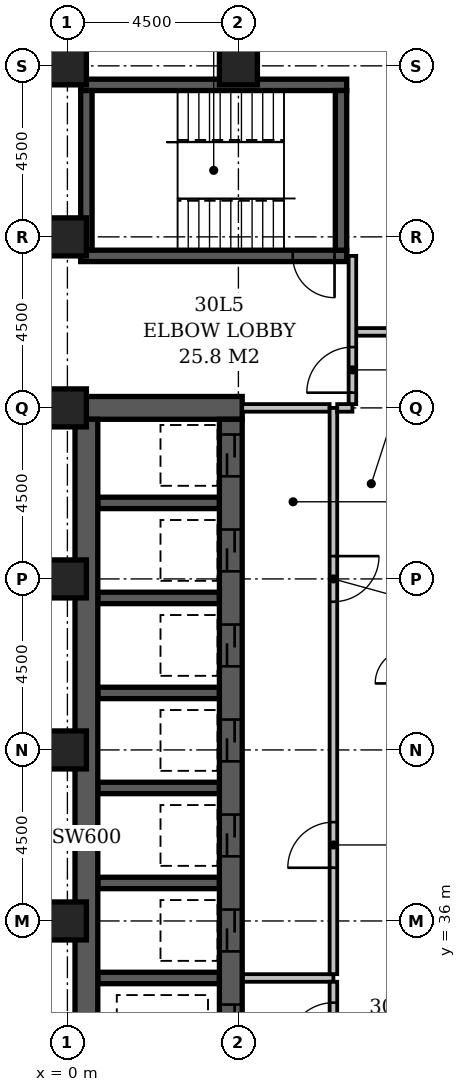
"""IFC4 building model, lengths in metres.
Left out: names, types, materials, properties, quantities, classifications, styles, units other than length and angle.
Written with IfcOpenShell. Run it as: python <this file> out.ifc"""

import sys

from ifc_helpers import new_model, si_unit, direction, frame, frame_2d, origin, origin_2d, place, context, subcontext, project, spatial, rectangle, extrude, element, fill, save


model = new_model("IFC4")
c1 = context("Model", 3, precision=1e-05, world=origin(), true_north=direction((0.0, 1.0)))
c2 = subcontext(c1, "Body", "Model", "MODEL_VIEW")
j1 = project(units=[si_unit("LENGTHUNIT", "METRE"), si_unit("PLANEANGLEUNIT", "RADIAN")], contexts=[c1])
p1 = place(None, origin())
s1 = spatial("IfcSite", under=j1, at=p1, CompositionType="ELEMENT")
p2 = place(p1, origin())
s2 = spatial("IfcBuilding", under=s1, at=p2, CompositionType="ELEMENT")
p3 = place(p2, frame((0.0, 0.0, 123.2)))
s3 = spatial("IfcBuildingStorey", under=s2, at=p3, CompositionType="ELEMENT", Elevation=123.2)
p4 = place(p3, frame((0.2, 49.5, -0.3), z_axis=(0.0, 0.0, 1.0), x_axis=(1.0, 0.0, 0.0)))
e1 = element("IfcWall", 1, at=p4, inside=s3, PredefinedType="SHEAR", context=c2, shape_type="SweptSolid", body=[
    extrude(rectangle(XDim=4.4, YDim=0.6, at=frame_2d((2.2, 0.0))), origin(), (0.0, 0.0, 1.0), 3.6),
])
p5 = place(p3, frame((0.35, 53.5, -0.3), z_axis=(0.0, 0.0, 1.0), x_axis=(1.0, 0.0, 0.0)))
e2 = element("IfcWall", 2, at=p5, inside=s3, PredefinedType="SHEAR", context=c2, shape_type="SweptSolid", body=[
    extrude(rectangle(XDim=7.0, YDim=0.3, at=frame_2d((3.5, 0.0))), origin(), (0.0, 0.0, 1.0), 3.6),
])
p6 = place(p5, frame((5.58, 0.0, 0.3)))
e3 = element("IfcOpeningElement", 3, at=p6, cuts=e2, PredefinedType="OPENING", context=c2, shape_type="SweptSolid", body=[
    extrude(rectangle(XDim=1.1, YDim=2.1, at=frame_2d((0.55, 1.05))), frame((0.0, 0.162, 0.0), z_axis=(0.0, -1.0, 0.0), x_axis=(1.0, 0.0, 0.0)), (0.0, 0.0, 1.0), 0.324),
])
p7 = place(p3, frame((0.35, 58.0, -0.3), z_axis=(0.0, 0.0, 1.0), x_axis=(1.0, 0.0, 0.0)))
e4 = element("IfcWall", 4, at=p7, inside=s3, PredefinedType="SHEAR", context=c2, shape_type="SweptSolid", body=[
    extrude(rectangle(XDim=7.0, YDim=0.3, at=frame_2d((3.5, 0.0))), origin(), (0.0, 0.0, 1.0), 3.6),
])
p8 = place(p3, frame((0.5, 27.15, -0.3), z_axis=(0.0, 0.0, 1.0), x_axis=(0.0, 1.0, 0.0)))
e5 = element("IfcWall", 5, at=p8, inside=s3, PredefinedType="SHEAR", context=c2, shape_type="SweptSolid", body=[
    extrude(rectangle(XDim=22.05, YDim=0.6, at=frame_2d((11.025, 0.0))), origin(), (0.0, 0.0, 1.0), 3.6),
])
p9 = place(p3, frame((0.5, 53.65, -0.3), z_axis=(0.0, 0.0, 1.0), x_axis=(0.0, 1.0, 0.0)))
e6 = element("IfcWall", 6, at=p9, inside=s3, PredefinedType="SHEAR", context=c2, shape_type="SweptSolid", body=[
    extrude(rectangle(XDim=4.2, YDim=0.3, at=frame_2d((2.1, 0.0))), origin(), (0.0, 0.0, 1.0), 3.6),
])
for number, where, z_axis, x_axis in (
    (7, (0.8, 34.5, -0.3), (0.0, 0.0, 1.0), (1.0, 0.0, 0.0)),
    (8, (0.8, 37.0, -0.3), (0.0, 0.0, 1.0), (1.0, 0.0, 0.0)),
    (9, (0.8, 39.5, -0.3), (0.0, 0.0, 1.0), (1.0, 0.0, 0.0)),
    (10, (0.8, 42.0, -0.3), (0.0, 0.0, 1.0), (1.0, 0.0, 0.0)),
    (11, (0.8, 44.5, -0.3), (0.0, 0.0, 1.0), (1.0, 0.0, 0.0)),
    (12, (0.8, 47.0, -0.3), (0.0, 0.0, 1.0), (1.0, 0.0, 0.0)),
):
    element("IfcWall", number, at=place(p3, frame(where, z_axis=z_axis, x_axis=x_axis)), inside=s3, PredefinedType="SHEAR", context=c2, shape_type="SweptSolid", body=[
        extrude(rectangle(XDim=3.2, YDim=0.3, at=frame_2d((1.6, 0.0))), origin(), (0.0, 0.0, 1.0), 3.6),
    ])
p10 = place(p3, frame((4.3, 27.15, -0.3), z_axis=(0.0, 0.0, 1.0), x_axis=(0.0, 1.0, 0.0)))
e13 = element("IfcWall", 13, at=p10, inside=s3, PredefinedType="SHEAR", context=c2, shape_type="SweptSolid", body=[
    extrude(rectangle(XDim=22.05, YDim=0.6, at=frame_2d((11.025, 0.0))), origin(), (0.0, 0.0, 1.0), 3.6),
])
p11 = place(p10, frame((3.05, 0.0, 0.3)))
e14 = element("IfcOpeningElement", 14, at=p11, cuts=e13, PredefinedType="OPENING", context=c2, shape_type="SweptSolid", body=[
    extrude(rectangle(XDim=1.1, YDim=2.1, at=frame_2d((0.55, 1.05))), frame((0.0, 0.312, 0.0), z_axis=(0.0, -1.0, 0.0), x_axis=(1.0, 0.0, 0.0)), (0.0, 0.0, 1.0), 0.624),
])
p12 = place(p10, frame((0.55, 0.0, 0.3)))
e15 = element("IfcOpeningElement", 15, at=p12, cuts=e13, PredefinedType="OPENING", context=c2, shape_type="SweptSolid", body=[
    extrude(rectangle(XDim=1.1, YDim=2.1, at=frame_2d((0.55, 1.05))), frame((0.0, 0.312, 0.0), z_axis=(0.0, -1.0, 0.0), x_axis=(1.0, 0.0, 0.0)), (0.0, 0.0, 1.0), 0.624),
])
p13 = place(p10, frame((20.55, 0.0, 0.3)))
e16 = element("IfcOpeningElement", 16, at=p13, cuts=e13, PredefinedType="OPENING", context=c2, shape_type="SweptSolid", body=[
    extrude(rectangle(XDim=1.1, YDim=2.1, at=frame_2d((0.55, 1.05))), frame((0.0, 0.312, 0.0), z_axis=(0.0, -1.0, 0.0), x_axis=(1.0, 0.0, 0.0)), (0.0, 0.0, 1.0), 0.624),
])
p14 = place(p10, frame((18.05, 0.0, 0.3)))
e17 = element("IfcOpeningElement", 17, at=p14, cuts=e13, PredefinedType="OPENING", context=c2, shape_type="SweptSolid", body=[
    extrude(rectangle(XDim=1.1, YDim=2.1, at=frame_2d((0.55, 1.05))), frame((0.0, 0.312, 0.0), z_axis=(0.0, -1.0, 0.0), x_axis=(1.0, 0.0, 0.0)), (0.0, 0.0, 1.0), 0.624),
])
p15 = place(p10, frame((15.55, 0.0, 0.3)))
e18 = element("IfcOpeningElement", 18, at=p15, cuts=e13, PredefinedType="OPENING", context=c2, shape_type="SweptSolid", body=[
    extrude(rectangle(XDim=1.1, YDim=2.1, at=frame_2d((0.55, 1.05))), frame((0.0, 0.312, 0.0), z_axis=(0.0, -1.0, 0.0), x_axis=(1.0, 0.0, 0.0)), (0.0, 0.0, 1.0), 0.624),
])
p16 = place(p10, frame((13.05, 0.0, 0.3)))
e19 = element("IfcOpeningElement", 19, at=p16, cuts=e13, PredefinedType="OPENING", context=c2, shape_type="SweptSolid", body=[
    extrude(rectangle(XDim=1.1, YDim=2.1, at=frame_2d((0.55, 1.05))), frame((0.0, 0.312, 0.0), z_axis=(0.0, -1.0, 0.0), x_axis=(1.0, 0.0, 0.0)), (0.0, 0.0, 1.0), 0.624),
])
p17 = place(p10, frame((10.55, 0.0, 0.3)))
e20 = element("IfcOpeningElement", 20, at=p17, cuts=e13, PredefinedType="OPENING", context=c2, shape_type="SweptSolid", body=[
    extrude(rectangle(XDim=1.1, YDim=2.1, at=frame_2d((0.55, 1.05))), frame((0.0, 0.312, 0.0), z_axis=(0.0, -1.0, 0.0), x_axis=(1.0, 0.0, 0.0)), (0.0, 0.0, 1.0), 0.624),
])
p18 = place(p10, frame((8.05, 0.0, 0.3)))
e21 = element("IfcOpeningElement", 21, at=p18, cuts=e13, PredefinedType="OPENING", context=c2, shape_type="SweptSolid", body=[
    extrude(rectangle(XDim=1.1, YDim=2.1, at=frame_2d((0.55, 1.05))), frame((0.0, 0.312, 0.0), z_axis=(0.0, -1.0, 0.0), x_axis=(1.0, 0.0, 0.0)), (0.0, 0.0, 1.0), 0.624),
])
p19 = place(p10, frame((5.55, 0.0, 0.3)))
e22 = element("IfcOpeningElement", 22, at=p19, cuts=e13, PredefinedType="OPENING", context=c2, shape_type="SweptSolid", body=[
    extrude(rectangle(XDim=1.1, YDim=2.1, at=frame_2d((0.55, 1.05))), frame((0.0, 0.312, 0.0), z_axis=(0.0, -1.0, 0.0), x_axis=(1.0, 0.0, 0.0)), (0.0, 0.0, 1.0), 0.624),
])
p20 = place(p3, frame((7.2, 53.65, -0.3), z_axis=(0.0, 0.0, 1.0), x_axis=(0.0, 1.0, 0.0)))
e23 = element("IfcWall", 23, at=p20, inside=s3, PredefinedType="SHEAR", context=c2, shape_type="SweptSolid", body=[
    extrude(rectangle(XDim=4.2, YDim=0.3, at=frame_2d((2.1, 0.0))), origin(), (0.0, 0.0, 1.0), 3.6),
])
for number, where, z_axis, x_axis in (
    (24, (0.0, 36.0, -0.3), (0.0, 0.0, 1.0), (1.0, 0.0, 0.0)),
    (25, (0.0, 40.5, -0.3), (0.0, 0.0, 1.0), (1.0, 0.0, 0.0)),
    (26, (0.0, 45.0, -0.3), (0.0, 0.0, 1.0), (1.0, 0.0, 0.0)),
    (27, (0.0, 49.5, -0.3), (0.0, 0.0, 1.0), (1.0, 0.0, 0.0)),
    (28, (0.0, 54.0, -0.3), (0.0, 0.0, 1.0), (1.0, 0.0, 0.0)),
    (29, (0.0, 58.5, -0.3), (0.0, 0.0, 1.0), (1.0, 0.0, 0.0)),
    (30, (4.5, 58.5, -0.3), (0.0, 0.0, 1.0), (1.0, 0.0, 0.0)),
):
    element("IfcColumn", number, at=place(p3, frame(where, z_axis=z_axis, x_axis=x_axis)), inside=s3, PredefinedType="COLUMN", context=c2, shape_type="SweptSolid", body=[
        extrude(rectangle(XDim=1.0, YDim=1.0, at=origin_2d()), origin(), (0.0, 0.0, 1.0), 3.6),
    ])
p21 = place(p3, frame((4.62, 34.5, 0.0), z_axis=(0.0, 0.0, 1.0), x_axis=(1.0, 0.0, 0.0)))
e31 = element("IfcWall", 31, at=p21, inside=s3, PredefinedType="PARTITIONING", context=c2, shape_type="SweptSolid", body=[
    extrude(rectangle(XDim=2.38, YDim=0.2, at=frame_2d((1.19, 0.0))), origin(), (0.0, 0.0, 1.0), 3.3),
])
p22 = place(p3, frame((7.0, 34.6, 0.0), z_axis=(0.0, 0.0, 1.0), x_axis=(0.0, 1.0, 0.0)))
e32 = element("IfcWall", 32, at=p22, inside=s3, PredefinedType="PARTITIONING", context=c2, shape_type="SweptSolid", body=[
    extrude(rectangle(XDim=14.9, YDim=0.2, at=frame_2d((7.45, 0.0))), origin(), (0.0, 0.0, 1.0), 3.3),
])
p23 = place(p22, frame((2.8, 0.0, 0.0)))
e33 = element("IfcOpeningElement", 33, at=p23, cuts=e32, PredefinedType="OPENING", context=c2, shape_type="SweptSolid", body=[
    extrude(rectangle(XDim=1.2, YDim=2.1, at=frame_2d((0.6, 1.05))), frame((0.0, 0.112, 0.0), z_axis=(0.0, -1.0, 0.0), x_axis=(1.0, 0.0, 0.0)), (0.0, 0.0, 1.0), 0.224),
])
p24 = place(p22, frame((9.8, 0.0, 0.0)))
e34 = element("IfcOpeningElement", 34, at=p24, cuts=e32, PredefinedType="OPENING", context=c2, shape_type="SweptSolid", body=[
    extrude(rectangle(XDim=1.2, YDim=2.1, at=frame_2d((0.6, 1.05))), frame((0.0, 0.112, 0.0), z_axis=(0.0, -1.0, 0.0), x_axis=(1.0, 0.0, 0.0)), (0.0, 0.0, 1.0), 0.224),
])
p25 = place(p3, frame((4.6, 49.5, 0.0), z_axis=(0.0, 0.0, 1.0), x_axis=(1.0, 0.0, 0.0)))
e35 = element("IfcWall", 35, at=p25, inside=s3, PredefinedType="PARTITIONING", context=c2, shape_type="SweptSolid", body=[
    extrude(rectangle(XDim=2.3, YDim=0.2, at=frame_2d((1.15, 0.0))), origin(), (0.0, 0.0, 1.0), 3.3),
])
p26 = place(p3, frame((7.0, 32.1, 0.0), z_axis=(0.0, 0.0, 1.0), x_axis=(0.0, 1.0, 0.0)))
e36 = element("IfcWall", 36, at=p26, inside=s3, PredefinedType="PARTITIONING", context=c2, shape_type="SweptSolid", body=[
    extrude(rectangle(XDim=2.3, YDim=0.2, at=frame_2d((1.15, 0.0))), origin(), (0.0, 0.0, 1.0), 3.3),
])
p27 = place(p26, frame((0.55, 0.0, 0.0)))
e37 = element("IfcOpeningElement", 37, at=p27, cuts=e36, PredefinedType="OPENING", context=c2, shape_type="SweptSolid", body=[
    extrude(rectangle(XDim=1.2, YDim=2.1, at=frame_2d((0.6, 1.05))), frame((0.0, 0.112, 0.0), z_axis=(0.0, -1.0, 0.0), x_axis=(1.0, 0.0, 0.0)), (0.0, 0.0, 1.0), 0.224),
])
p28 = place(p3, frame((7.1, 49.5, 0.0), z_axis=(0.0, 0.0, 1.0), x_axis=(1.0, 0.0, 0.0)))
e38 = element("IfcWall", 38, at=p28, inside=s3, PredefinedType="PARTITIONING", context=c2, shape_type="SweptSolid", body=[
    extrude(rectangle(XDim=0.4, YDim=0.2, at=frame_2d((0.2, 0.0))), origin(), (0.0, 0.0, 1.0), 3.3),
])
p29 = place(p3, frame((7.5, 49.6, 0.0), z_axis=(0.0, 0.0, 1.0), x_axis=(0.0, 1.0, 0.0)))
e39 = element("IfcWall", 39, at=p29, inside=s3, PredefinedType="PARTITIONING", context=c2, shape_type="SweptSolid", body=[
    extrude(rectangle(XDim=3.9, YDim=0.2, at=frame_2d((1.95, 0.0))), origin(), (0.0, 0.0, 1.0), 3.3),
])
p30 = place(p29, frame((0.3, 0.0, 0.0)))
e40 = element("IfcOpeningElement", 40, at=p30, cuts=e39, PredefinedType="OPENING", context=c2, shape_type="SweptSolid", body=[
    extrude(rectangle(XDim=1.2, YDim=2.1, at=frame_2d((0.6, 1.05))), frame((0.0, 0.112, 0.0), z_axis=(0.0, -1.0, 0.0), x_axis=(1.0, 0.0, 0.0)), (0.0, 0.0, 1.0), 0.224),
])
p31 = place(p3, frame((7.6, 51.5, 0.0), z_axis=(0.0, 0.0, 1.0), x_axis=(1.0, 0.0, 0.0)))
e41 = element("IfcWall", 41, at=p31, inside=s3, PredefinedType="PARTITIONING", context=c2, shape_type="SweptSolid", body=[
    extrude(rectangle(XDim=15.3, YDim=0.2, at=frame_2d((7.65, 0.0))), origin(), (0.0, 0.0, 1.0), 3.3),
])
p32 = place(p31, frame((7.2, 0.0, 0.0)))
e42 = element("IfcOpeningElement", 42, at=p32, cuts=e41, PredefinedType="OPENING", context=c2, shape_type="SweptSolid", body=[
    extrude(rectangle(XDim=0.9, YDim=2.1, at=frame_2d((0.45, 1.05))), frame((0.0, 0.112, 0.0), z_axis=(0.0, -1.0, 0.0), x_axis=(1.0, 0.0, 0.0)), (0.0, 0.0, 1.0), 0.224),
])
p33 = place(p30, origin())
e43 = element("IfcDoor", 43, at=p33, inside=s3, OperationType="SINGLE_SWING_LEFT", PredefinedType="DOOR", context=c2, shape_type="SweptSolid", body=[
    extrude(rectangle(XDim=1.2, YDim=2.1, at=frame_2d((0.6, 1.05))), frame((0.0, 0.025, 0.0), z_axis=(0.0, -1.0, 0.0), x_axis=(1.0, 0.0, 0.0)), (0.0, 0.0, 1.0), 0.05),
])
fill(e40, e43)
p34 = place(p13, origin())
e44 = element("IfcDoor", 44, at=p34, inside=s3, OperationType="SLIDING_TO_LEFT", PredefinedType="DOOR", context=c2, shape_type="SweptSolid", body=[
    extrude(rectangle(XDim=1.1, YDim=2.1, at=frame_2d((0.55, 1.05))), frame((0.0, 0.025, 0.0), z_axis=(0.0, -1.0, 0.0), x_axis=(1.0, 0.0, 0.0)), (0.0, 0.0, 1.0), 0.05),
])
fill(e16, e44)
p35 = place(p14, origin())
e45 = element("IfcDoor", 45, at=p35, inside=s3, OperationType="SLIDING_TO_LEFT", PredefinedType="DOOR", context=c2, shape_type="SweptSolid", body=[
    extrude(rectangle(XDim=1.1, YDim=2.1, at=frame_2d((0.55, 1.05))), frame((0.0, 0.025, 0.0), z_axis=(0.0, -1.0, 0.0), x_axis=(1.0, 0.0, 0.0)), (0.0, 0.0, 1.0), 0.05),
])
fill(e17, e45)
p36 = place(p15, origin())
e46 = element("IfcDoor", 46, at=p36, inside=s3, OperationType="SLIDING_TO_LEFT", PredefinedType="DOOR", context=c2, shape_type="SweptSolid", body=[
    extrude(rectangle(XDim=1.1, YDim=2.1, at=frame_2d((0.55, 1.05))), frame((0.0, 0.025, 0.0), z_axis=(0.0, -1.0, 0.0), x_axis=(1.0, 0.0, 0.0)), (0.0, 0.0, 1.0), 0.05),
])
fill(e18, e46)
p37 = place(p16, origin())
e47 = element("IfcDoor", 47, at=p37, inside=s3, OperationType="SLIDING_TO_LEFT", PredefinedType="DOOR", context=c2, shape_type="SweptSolid", body=[
    extrude(rectangle(XDim=1.1, YDim=2.1, at=frame_2d((0.55, 1.05))), frame((0.0, 0.025, 0.0), z_axis=(0.0, -1.0, 0.0), x_axis=(1.0, 0.0, 0.0)), (0.0, 0.0, 1.0), 0.05),
])
fill(e19, e47)
p38 = place(p17, origin())
e48 = element("IfcDoor", 48, at=p38, inside=s3, OperationType="SLIDING_TO_LEFT", PredefinedType="DOOR", context=c2, shape_type="SweptSolid", body=[
    extrude(rectangle(XDim=1.1, YDim=2.1, at=frame_2d((0.55, 1.05))), frame((0.0, 0.025, 0.0), z_axis=(0.0, -1.0, 0.0), x_axis=(1.0, 0.0, 0.0)), (0.0, 0.0, 1.0), 0.05),
])
fill(e20, e48)
p39 = place(p18, origin())
e49 = element("IfcDoor", 49, at=p39, inside=s3, OperationType="SLIDING_TO_LEFT", PredefinedType="DOOR", context=c2, shape_type="SweptSolid", body=[
    extrude(rectangle(XDim=1.1, YDim=2.1, at=frame_2d((0.55, 1.05))), frame((0.0, 0.025, 0.0), z_axis=(0.0, -1.0, 0.0), x_axis=(1.0, 0.0, 0.0)), (0.0, 0.0, 1.0), 0.05),
])
fill(e21, e49)
p40 = place(p23, origin())
e50 = element("IfcDoor", 50, at=p40, inside=s3, OperationType="SINGLE_SWING_LEFT", PredefinedType="DOOR", context=c2, shape_type="SweptSolid", body=[
    extrude(rectangle(XDim=1.2, YDim=2.1, at=frame_2d((0.6, 1.05))), frame((0.0, 0.025, 0.0), z_axis=(0.0, -1.0, 0.0), x_axis=(1.0, 0.0, 0.0)), (0.0, 0.0, 1.0), 0.05),
])
fill(e33, e50)
p41 = place(p24, origin())
e51 = element("IfcDoor", 51, at=p41, inside=s3, OperationType="SINGLE_SWING_RIGHT", PredefinedType="DOOR", context=c2, shape_type="SweptSolid", body=[
    extrude(rectangle(XDim=1.2, YDim=2.1, at=frame_2d((0.6, 1.05))), frame((0.0, 0.025, 0.0), z_axis=(0.0, -1.0, 0.0), x_axis=(1.0, 0.0, 0.0)), (0.0, 0.0, 1.0), 0.05),
])
fill(e34, e51)
p42 = place(p27, origin())
e52 = element("IfcDoor", 52, at=p42, inside=s3, OperationType="SINGLE_SWING_LEFT", PredefinedType="DOOR", context=c2, shape_type="SweptSolid", body=[
    extrude(rectangle(XDim=1.2, YDim=2.1, at=frame_2d((0.6, 1.05))), frame((0.0, 0.025, 0.0), z_axis=(0.0, -1.0, 0.0), x_axis=(1.0, 0.0, 0.0)), (0.0, 0.0, 1.0), 0.05),
])
fill(e37, e52)
p43 = place(p19, origin())
e53 = element("IfcDoor", 53, at=p43, inside=s3, OperationType="SLIDING_TO_LEFT", PredefinedType="DOOR", context=c2, shape_type="SweptSolid", body=[
    extrude(rectangle(XDim=1.1, YDim=2.1, at=frame_2d((0.55, 1.05))), frame((0.0, 0.025, 0.0), z_axis=(0.0, -1.0, 0.0), x_axis=(1.0, 0.0, 0.0)), (0.0, 0.0, 1.0), 0.05),
])
fill(e22, e53)
p44 = place(p6, origin())
e54 = element("IfcDoor", 54, at=p44, inside=s3, OperationType="SINGLE_SWING_RIGHT", PredefinedType="DOOR", context=c2, shape_type="SweptSolid", body=[
    extrude(rectangle(XDim=1.1, YDim=2.1, at=frame_2d((0.55, 1.05))), frame((0.0, 0.025, 0.0), z_axis=(0.0, -1.0, 0.0), x_axis=(1.0, 0.0, 0.0)), (0.0, 0.0, 1.0), 0.05),
])
fill(e3, e54)
save(model, sys.argv[1])
